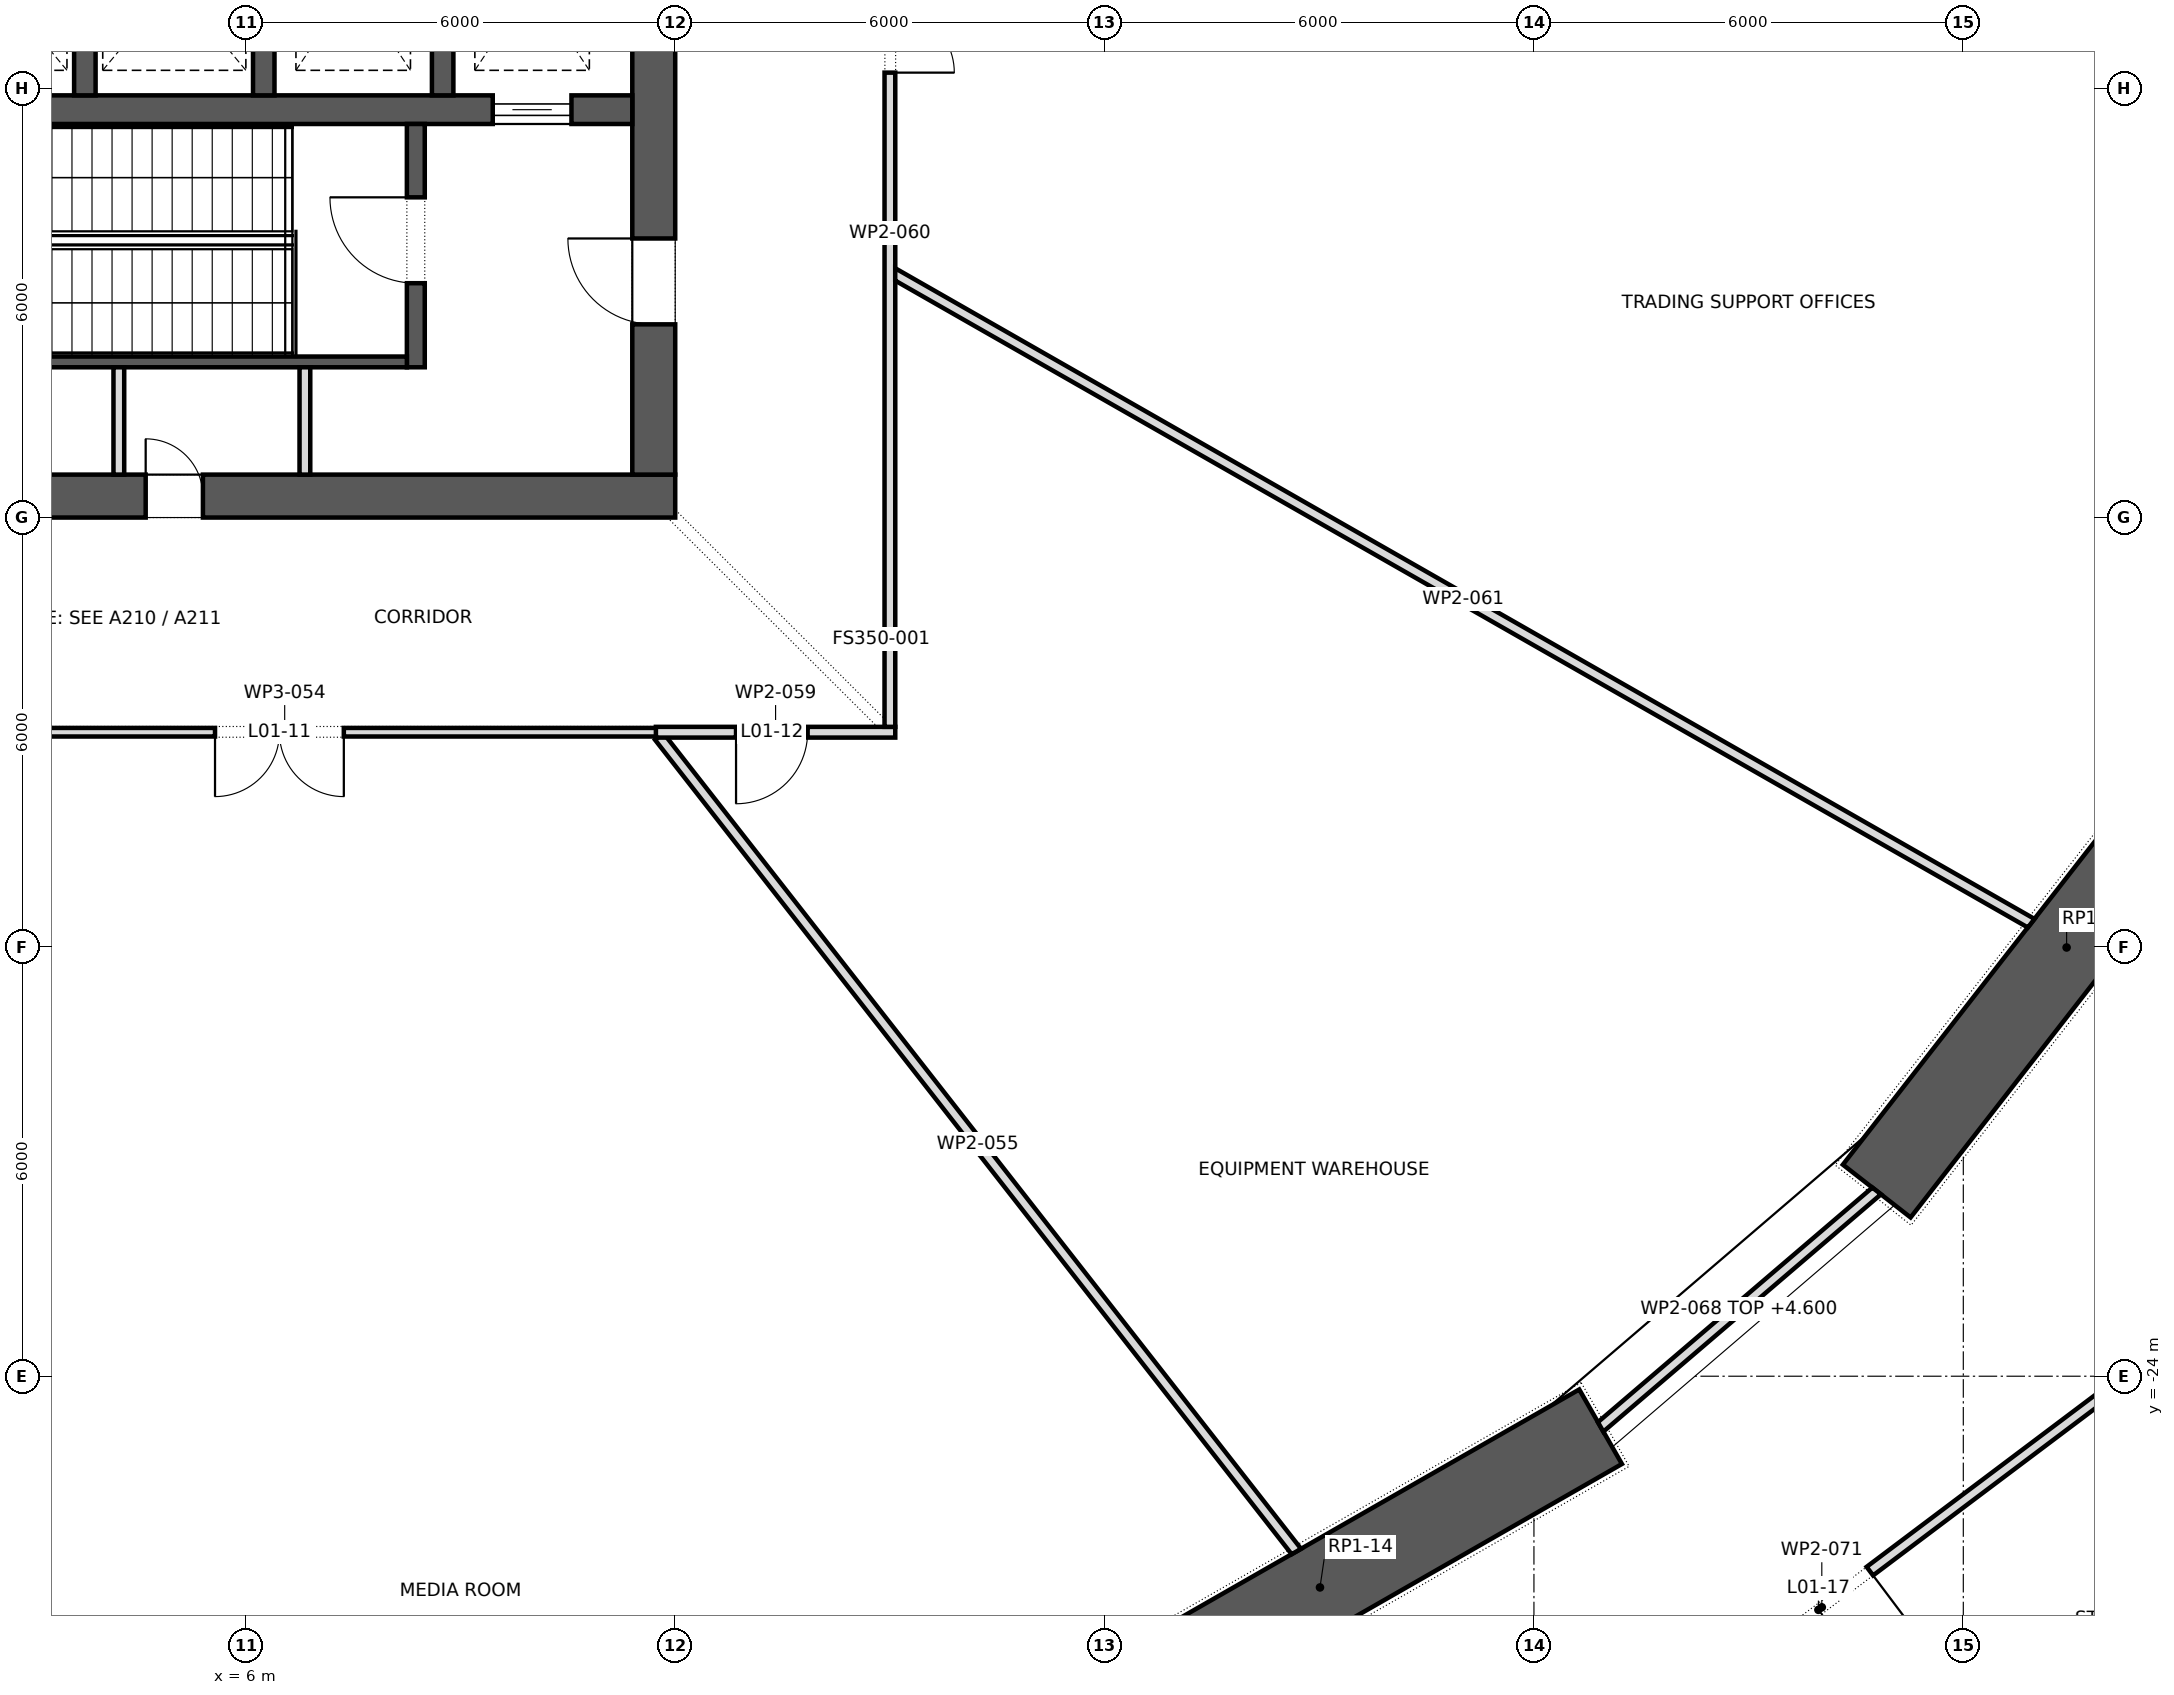
"""IFC4 building model, lengths in metres.
Left out: names, types, materials, properties, quantities, classifications, styles, units other than length and angle.
Written with IfcOpenShell. Run it as: python <this file> out.ifc"""

import sys

from ifc_helpers import new_model, si_unit, direction, frame, frame_2d, origin, place, context, subcontext, project, spatial, polyline, rectangle, outline, extrude, element, fill, save


model = new_model("IFC4")
c1 = context("Model", 3, precision=1e-05, world=origin(), true_north=direction((0.0, 1.0)))
c2 = subcontext(c1, "Body", "Model", "MODEL_VIEW")
j1 = project(units=[si_unit("LENGTHUNIT", "METRE"), si_unit("PLANEANGLEUNIT", "RADIAN")], contexts=[c1])
p1 = place(None, origin())
s1 = spatial("IfcSite", under=j1, at=p1, CompositionType="ELEMENT")
p2 = place(p1, origin())
s2 = spatial("IfcBuilding", under=s1, at=p2, CompositionType="ELEMENT")
p3 = place(p2, frame((0.0, 0.0, 7.0)))
s3 = spatial("IfcBuildingStorey", under=s2, at=p3, CompositionType="ELEMENT", Elevation=7.0)
p4 = place(p3, frame((17.089, -29.198, 0.0), z_axis=(0.0, 0.0, 1.0), x_axis=(0.867760656864, 0.496982336103, 0.0)))
e1 = element("IfcWall", 1, at=p4, inside=s3, PredefinedType="SHEAR", context=c2, shape_type="SweptSolid", body=[
    extrude(rectangle(XDim=9.038, YDim=1.2, at=frame_2d((4.519, 0.0))), origin(), (0.0, 0.0, 1.0), 5.5),
])
p5 = place(p3, frame((28.79, -21.412, 0.0), z_axis=(0.0, 0.0, 1.0), x_axis=(0.614825322247, 0.788663314174, 0.0)))
e2 = element("IfcWall", 2, at=p5, inside=s3, PredefinedType="SHEAR", context=c2, shape_type="SweptSolid", body=[
    extrude(rectangle(XDim=8.632, YDim=1.2, at=frame_2d((4.316, 0.0))), origin(), (0.0, 0.0, 1.0), 5.5),
])
p6 = place(p3, frame((-12.0, -11.7, 0.0), z_axis=(0.0, 0.0, 1.0), x_axis=(1.0, 0.0, 0.0)))
e3 = element("IfcWall", 3, at=p6, inside=s3, PredefinedType="SHEAR", context=c2, shape_type="SweptSolid", body=[
    extrude(rectangle(XDim=24.0, YDim=0.6, at=frame_2d((12.0, 0.0))), origin(), (0.0, 0.0, 1.0), 5.5),
])
p7 = place(p6, frame((9.275, 0.0, 0.0)))
e4 = element("IfcOpeningElement", 4, at=p7, cuts=e3, PredefinedType="OPENING", context=c2, shape_type="SweptSolid", body=[
    extrude(rectangle(XDim=0.9, YDim=2.1, at=frame_2d((0.45, 1.05))), frame((0.0, 0.312, 0.0), z_axis=(0.0, -1.0, 0.0), x_axis=(1.0, 0.0, 0.0)), (0.0, 0.0, 1.0), 0.624),
])
p8 = place(p6, frame((10.925, 0.0, 0.0)))
e5 = element("IfcOpeningElement", 5, at=p8, cuts=e3, PredefinedType="OPENING", context=c2, shape_type="SweptSolid", body=[
    extrude(rectangle(XDim=0.9, YDim=2.1, at=frame_2d((0.45, 1.05))), frame((0.0, 0.312, 0.0), z_axis=(0.0, -1.0, 0.0), x_axis=(1.0, 0.0, 0.0)), (0.0, 0.0, 1.0), 0.624),
])
p9 = place(p6, frame((4.2, 0.0, 0.0)))
e6 = element("IfcOpeningElement", 6, at=p9, cuts=e3, PredefinedType="OPENING", context=c2, shape_type="SweptSolid", body=[
    extrude(rectangle(XDim=0.8, YDim=2.1, at=frame_2d((0.4, 1.05))), frame((0.0, 0.312, 0.0), z_axis=(0.0, -1.0, 0.0), x_axis=(1.0, 0.0, 0.0)), (0.0, 0.0, 1.0), 0.624),
])
p10 = place(p6, frame((6.8, 0.0, 0.0)))
e7 = element("IfcOpeningElement", 7, at=p10, cuts=e3, PredefinedType="OPENING", context=c2, shape_type="SweptSolid", body=[
    extrude(rectangle(XDim=0.8, YDim=2.1, at=frame_2d((0.4, 1.05))), frame((0.0, 0.312, 0.0), z_axis=(0.0, -1.0, 0.0), x_axis=(1.0, 0.0, 0.0)), (0.0, 0.0, 1.0), 0.624),
])
p11 = place(p6, frame((13.8, 0.0, 0.0)))
e8 = element("IfcOpeningElement", 8, at=p11, cuts=e3, PredefinedType="OPENING", context=c2, shape_type="SweptSolid", body=[
    extrude(rectangle(XDim=0.8, YDim=2.1, at=frame_2d((0.4, 1.05))), frame((0.0, 0.312, 0.0), z_axis=(0.0, -1.0, 0.0), x_axis=(1.0, 0.0, 0.0)), (0.0, 0.0, 1.0), 0.624),
])
p12 = place(p6, frame((16.6, 0.0, 0.0)))
e9 = element("IfcOpeningElement", 9, at=p12, cuts=e3, PredefinedType="OPENING", context=c2, shape_type="SweptSolid", body=[
    extrude(rectangle(XDim=0.8, YDim=2.1, at=frame_2d((0.4, 1.05))), frame((0.0, 0.312, 0.0), z_axis=(0.0, -1.0, 0.0), x_axis=(1.0, 0.0, 0.0)), (0.0, 0.0, 1.0), 0.624),
])
p13 = place(p3, frame((11.7, -11.4, 0.0), z_axis=(0.0, 0.0, 1.0), x_axis=(0.0, 1.0, 0.0)))
e10 = element("IfcWall", 10, at=p13, inside=s3, PredefinedType="SHEAR", context=c2, shape_type="SweptSolid", body=[
    extrude(rectangle(XDim=22.8, YDim=0.6, at=frame_2d((11.4, 0.0))), origin(), (0.0, 0.0, 1.0), 5.5),
])
p14 = place(p13, frame((10.2, 0.0, 0.0)))
e11 = element("IfcOpeningElement", 11, at=p14, cuts=e10, PredefinedType="OPENING", context=c2, shape_type="SweptSolid", body=[
    extrude(rectangle(XDim=2.4, YDim=2.1, at=frame_2d((1.2, 1.05))), frame((0.0, 0.312, 0.0), z_axis=(0.0, -1.0, 0.0), x_axis=(1.0, 0.0, 0.0)), (0.0, 0.0, 1.0), 0.624),
])
p15 = place(p13, frame((19.5, 0.0, 0.0)))
e12 = element("IfcOpeningElement", 12, at=p15, cuts=e10, PredefinedType="OPENING", context=c2, shape_type="SweptSolid", body=[
    extrude(rectangle(XDim=1.2, YDim=2.1, at=frame_2d((0.6, 1.05))), frame((0.0, 0.312, 0.0), z_axis=(0.0, -1.0, 0.0), x_axis=(1.0, 0.0, 0.0)), (0.0, 0.0, 1.0), 0.624),
])
p16 = place(p13, frame((2.1, 0.0, 0.0)))
e13 = element("IfcOpeningElement", 13, at=p16, cuts=e10, PredefinedType="OPENING", context=c2, shape_type="SweptSolid", body=[
    extrude(rectangle(XDim=1.2, YDim=2.1, at=frame_2d((0.6, 1.05))), frame((0.0, 0.312, 0.0), z_axis=(0.0, -1.0, 0.0), x_axis=(1.0, 0.0, 0.0)), (0.0, 0.0, 1.0), 0.624),
])
p17 = place(p3, frame((-11.4, -6.3, 0.0), z_axis=(0.0, 0.0, 1.0), x_axis=(1.0, 0.0, 0.0)))
e14 = element("IfcWall", 14, at=p17, inside=s3, PredefinedType="SHEAR", context=c2, shape_type="SweptSolid", body=[
    extrude(rectangle(XDim=22.8, YDim=0.4, at=frame_2d((11.4, 0.0))), origin(), (0.0, 0.0, 1.0), 5.5),
])
p18 = place(p17, frame((20.85, 0.0, 0.0)))
e15 = element("IfcOpeningElement", 15, at=p18, cuts=e14, PredefinedType="OPENING", context=c2, shape_type="SweptSolid", body=[
    extrude(rectangle(XDim=1.1, YDim=2.1, at=frame_2d((0.55, 1.05))), frame((0.0, 0.212, 0.0), z_axis=(0.0, -1.0, 0.0), x_axis=(1.0, 0.0, 0.0)), (0.0, 0.0, 1.0), 0.424),
])
for number, where, z_axis, x_axis in (
    (16, (3.75, -6.1, 0.0), (0.0, 0.0, 1.0), (0.0, 1.0, 0.0)),
    (17, (6.25, -6.1, 0.0), (0.0, 0.0, 1.0), (0.0, 1.0, 0.0)),
    (18, (8.75, -6.1, 0.0), (0.0, 0.0, 1.0), (0.0, 1.0, 0.0)),
):
    element("IfcWall", number, at=place(p3, frame(where, z_axis=z_axis, x_axis=x_axis)), inside=s3, PredefinedType="SHEAR", context=c2, shape_type="SweptSolid", body=[
        extrude(rectangle(XDim=2.9, YDim=0.3, at=frame_2d((1.45, 0.0))), origin(), (0.0, 0.0, 1.0), 5.5),
    ])
p19 = place(p3, frame((8.375, -9.9, 0.0), z_axis=(0.0, 0.0, 1.0), x_axis=(0.0, 1.0, 0.0)))
e19 = element("IfcWall", 19, at=p19, inside=s3, PredefinedType="SHEAR", context=c2, shape_type="SweptSolid", body=[
    extrude(rectangle(XDim=3.4, YDim=0.25, at=frame_2d((1.7, 0.0))), origin(), (0.0, 0.0, 1.0), 5.15),
])
p20 = place(p19, frame((1.175, 0.0, 0.0)))
e20 = element("IfcOpeningElement", 20, at=p20, cuts=e19, PredefinedType="OPENING", context=c2, shape_type="SweptSolid", body=[
    extrude(rectangle(XDim=1.2, YDim=2.1, at=frame_2d((0.6, 1.05))), frame((0.0, 0.137, 0.0), z_axis=(0.0, -1.0, 0.0), x_axis=(1.0, 0.0, 0.0)), (0.0, 0.0, 1.0), 0.274),
])
p21 = place(p3, frame((0.25, -9.825, 0.0), z_axis=(0.0, 0.0, 1.0), x_axis=(1.0, 0.0, 0.0)))
e21 = element("IfcWall", 21, at=p21, inside=s3, PredefinedType="SHEAR", context=c2, shape_type="SweptSolid", body=[
    extrude(rectangle(XDim=8.0, YDim=0.15, at=frame_2d((4.0, 0.0))), origin(), (0.0, 0.0, 1.0), 5.15),
])
for number, where, z_axis, x_axis in (
    (22, (4.225, -11.4, 0.0), (0.0, 0.0, 1.0), (0.0, 1.0, 0.0)),
    (23, (6.825, -11.4, 0.0), (0.0, 0.0, 1.0), (0.0, 1.0, 0.0)),
):
    element("IfcWall", number, at=place(p3, frame(where, z_axis=z_axis, x_axis=x_axis)), inside=s3, PredefinedType="PARTITIONING", context=c2, shape_type="SweptSolid", body=[
        extrude(rectangle(XDim=1.5, YDim=0.15, at=frame_2d((0.75, 0.0))), origin(), (0.0, 0.0, 1.0), 5.15),
    ])
p22 = place(p3, frame((11.825, -15.0, 0.0), z_axis=(0.0, 0.0, 1.0), x_axis=(-1.0, 0.0, 0.0)))
e24 = element("IfcWall", 24, at=p22, inside=s3, PredefinedType="PARTITIONING", context=c2, shape_type="SweptSolid", body=[
    extrude(rectangle(XDim=10.565, YDim=0.12, at=frame_2d((5.283, 0.0))), origin(), (0.0, 0.0, 1.0), 5.15),
])
p23 = place(p22, frame((4.456, 0.0, 0.0)))
e25 = element("IfcOpeningElement", 25, at=p23, cuts=e24, PredefinedType="OPENING", context=c2, shape_type="SweptSolid", body=[
    extrude(rectangle(XDim=1.8, YDim=2.1, at=frame_2d((0.9, 1.05))), frame((0.0, 0.072, 0.0), z_axis=(0.0, -1.0, 0.0), x_axis=(1.0, 0.0, 0.0)), (0.0, 0.0, 1.0), 0.144),
])
p24 = place(p3, frame((11.777, -15.06, 0.0), z_axis=(0.0, 0.0, 1.0), x_axis=(0.615846879826, -0.787865864604, 0.0)))
e26 = element("IfcWall", 26, at=p24, inside=s3, PredefinedType="PARTITIONING", context=c2, shape_type="SweptSolid", body=[
    extrude(outline(polyline([(0.0, -0.075), (14.446, -0.075), (14.467, 0.075), (0.0, 0.075), (0.0, -0.075)])), origin(), (0.0, 0.0, 1.0), 5.15),
])
p25 = place(p3, frame((15.075, -15.0, 0.0), z_axis=(0.0, 0.0, 1.0), x_axis=(-1.0, 0.0, 0.0)))
e27 = element("IfcWall", 27, at=p25, inside=s3, PredefinedType="PARTITIONING", context=c2, shape_type="SweptSolid", body=[
    extrude(rectangle(XDim=3.345, YDim=0.15, at=frame_2d((1.672, 0.0))), origin(), (0.0, 0.0, 1.0), 5.15),
])
p26 = place(p25, frame((1.225, 0.0, 0.0)))
e28 = element("IfcOpeningElement", 28, at=p26, cuts=e27, PredefinedType="OPENING", context=c2, shape_type="SweptSolid", body=[
    extrude(rectangle(XDim=1.0, YDim=2.1, at=frame_2d((0.5, 1.05))), frame((0.0, 0.087, 0.0), z_axis=(0.0, -1.0, 0.0), x_axis=(1.0, 0.0, 0.0)), (0.0, 0.0, 1.0), 0.174),
])
p27 = place(p3, frame((15.0, -14.925, 0.0), z_axis=(0.0, 0.0, 1.0), x_axis=(0.0, 1.0, 0.0)))
e29 = element("IfcWall", 29, at=p27, inside=s3, PredefinedType="PARTITIONING", context=c2, shape_type="SweptSolid", body=[
    extrude(rectangle(XDim=13.8, YDim=0.15, at=frame_2d((6.9, 0.0))), origin(), (0.0, 0.0, 1.0), 5.15),
])
p28 = place(p27, frame((9.143, 0.0, 0.0)))
e30 = element("IfcOpeningElement", 30, at=p28, cuts=e29, PredefinedType="OPENING", context=c2, shape_type="SweptSolid", body=[
    extrude(rectangle(XDim=1.8, YDim=2.1, at=frame_2d((0.9, 1.05))), frame((0.0, 0.087, 0.0), z_axis=(0.0, -1.0, 0.0), x_axis=(1.0, 0.0, 0.0)), (0.0, 0.0, 1.0), 0.174),
])
p29 = place(p3, frame((15.074, -8.602, 0.0), z_axis=(0.0, 0.0, 1.0), x_axis=(0.868343386691, -0.495963469209, 0.0)))
e31 = element("IfcWall", 31, at=p29, inside=s3, PredefinedType="PARTITIONING", context=c2, shape_type="SweptSolid", body=[
    extrude(outline(polyline([(0.043, -0.075), (18.271, -0.075), (18.292, 0.075), (-0.043, 0.075), (0.043, -0.075)])), origin(), (0.0, 0.0, 1.0), 5.15),
])
p30 = place(p3, frame((24.932, -24.708, 0.0), z_axis=(0.0, 0.0, 1.0), x_axis=(0.760084552743, 0.649824185978, 0.0)))
e32 = element("IfcWall", 32, at=p30, inside=s3, PredefinedType="PARTITIONING", context=c2, shape_type="SweptSolid", body=[
    extrude(outline(polyline([(-0.014, -0.075), (5.09, -0.075), (5.06, 0.075), (0.014, 0.075), (-0.014, -0.075)])), origin(), (0.0, 0.0, 1.0), 4.6),
])
p31 = place(p3, frame((32.184, -24.099, 0.0), z_axis=(0.0, 0.0, 1.0), x_axis=(-0.799200371747, -0.601064693523, 0.0)))
e33 = element("IfcWall", 33, at=p31, inside=s3, PredefinedType="PARTITIONING", context=c2, shape_type="SweptSolid", body=[
    extrude(rectangle(XDim=10.415, YDim=0.15, at=frame_2d((5.207, 0.0))), origin(), (0.0, 0.0, 1.0), 5.15),
])
p32 = place(p31, frame((4.367, 0.0, 0.0)))
e34 = element("IfcOpeningElement", 34, at=p32, cuts=e33, PredefinedType="OPENING", context=c2, shape_type="SweptSolid", body=[
    extrude(rectangle(XDim=1.8, YDim=2.1, at=frame_2d((0.9, 1.05))), frame((0.0, 0.087, 0.0), z_axis=(0.0, -1.0, 0.0), x_axis=(1.0, 0.0, 0.0)), (0.0, 0.0, 1.0), 0.174),
])
p33 = place(p18, origin())
e35 = element("IfcDoor", 35, at=p33, inside=s3, OperationType="SLIDING_TO_LEFT", PredefinedType="DOOR", context=c2, shape_type="SweptSolid", body=[
    extrude(rectangle(XDim=1.1, YDim=2.1, at=frame_2d((0.55, 1.05))), frame((0.0, 0.025, 0.0), z_axis=(0.0, -1.0, 0.0), x_axis=(1.0, 0.0, 0.0)), (0.0, 0.0, 1.0), 0.05),
])
fill(e15, e35)
p34 = place(p20, origin())
e36 = element("IfcDoor", 36, at=p34, inside=s3, OperationType="SINGLE_SWING_LEFT", PredefinedType="DOOR", context=c2, shape_type="SweptSolid", body=[
    extrude(rectangle(XDim=1.2, YDim=2.1, at=frame_2d((0.6, 1.05))), frame((0.0, 0.025, 0.0), z_axis=(0.0, -1.0, 0.0), x_axis=(1.0, 0.0, 0.0)), (0.0, 0.0, 1.0), 0.05),
])
fill(e20, e36)
p35 = place(p16, origin())
e37 = element("IfcDoor", 37, at=p35, inside=s3, OperationType="SINGLE_SWING_LEFT", PredefinedType="DOOR", context=c2, shape_type="SweptSolid", body=[
    extrude(rectangle(XDim=1.2, YDim=2.1, at=frame_2d((0.6, 1.05))), frame((0.0, 0.025, 0.0), z_axis=(0.0, -1.0, 0.0), x_axis=(1.0, 0.0, 0.0)), (0.0, 0.0, 1.0), 0.05),
])
fill(e13, e37)
p36 = place(p12, origin())
e38 = element("IfcDoor", 38, at=p36, inside=s3, OperationType="SINGLE_SWING_RIGHT", PredefinedType="DOOR", context=c2, shape_type="SweptSolid", body=[
    extrude(rectangle(XDim=0.8, YDim=2.1, at=frame_2d((0.4, 1.05))), frame((0.0, 0.025, 0.0), z_axis=(0.0, -1.0, 0.0), x_axis=(1.0, 0.0, 0.0)), (0.0, 0.0, 1.0), 0.05),
])
fill(e9, e38)
p37 = place(p23, origin())
e39 = element("IfcDoor", 39, at=p37, inside=s3, OperationType="DOUBLE_DOOR_SINGLE_SWING", PredefinedType="DOOR", context=c2, shape_type="SweptSolid", body=[
    extrude(rectangle(XDim=1.8, YDim=2.1, at=frame_2d((0.9, 1.05))), frame((0.0, 0.025, 0.0), z_axis=(0.0, -1.0, 0.0), x_axis=(1.0, 0.0, 0.0)), (0.0, 0.0, 1.0), 0.05),
])
fill(e25, e39)
p38 = place(p26, origin())
e40 = element("IfcDoor", 40, at=p38, inside=s3, OperationType="SINGLE_SWING_LEFT", PredefinedType="DOOR", context=c2, shape_type="SweptSolid", body=[
    extrude(rectangle(XDim=1.0, YDim=2.1, at=frame_2d((0.5, 1.05))), frame((0.0, 0.025, 0.0), z_axis=(0.0, -1.0, 0.0), x_axis=(1.0, 0.0, 0.0)), (0.0, 0.0, 1.0), 0.05),
])
fill(e28, e40)
p39 = place(p28, frame((1.8, 0.0, 0.0), z_axis=(0.0, 0.0, 1.0), x_axis=(-1.0, 0.0, 0.0)))
e41 = element("IfcDoor", 41, at=p39, inside=s3, OperationType="DOUBLE_DOOR_SINGLE_SWING", PredefinedType="DOOR", context=c2, shape_type="SweptSolid", body=[
    extrude(rectangle(XDim=1.8, YDim=2.1, at=frame_2d((0.9, 1.05))), frame((0.0, 0.025, 0.0), z_axis=(0.0, -1.0, 0.0), x_axis=(1.0, 0.0, 0.0)), (0.0, 0.0, 1.0), 0.05),
])
fill(e30, e41)
p40 = place(p32, origin())
e42 = element("IfcDoor", 42, at=p40, inside=s3, OperationType="DOUBLE_DOOR_SINGLE_SWING", PredefinedType="DOOR", context=c2, shape_type="SweptSolid", body=[
    extrude(rectangle(XDim=1.8, YDim=2.1, at=frame_2d((0.9, 1.05))), frame((0.0, 0.025, 0.0), z_axis=(0.0, -1.0, 0.0), x_axis=(1.0, 0.0, 0.0)), (0.0, 0.0, 1.0), 0.05),
])
fill(e34, e42)
save(model, sys.argv[1])
